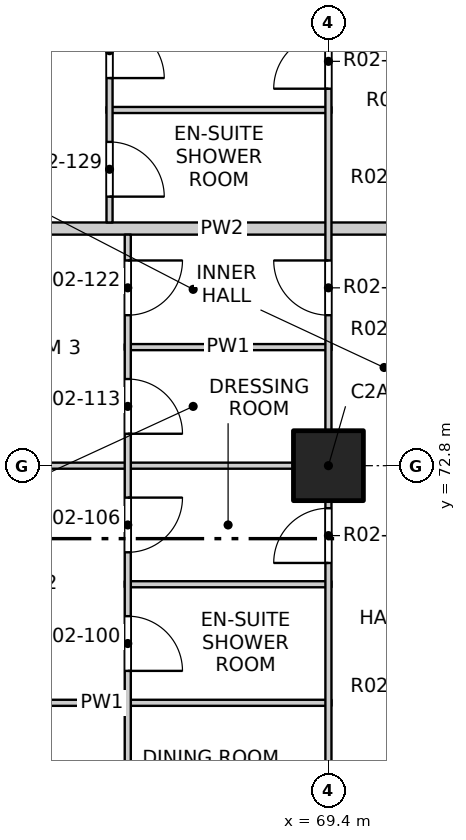
"""IFC4 building model, lengths in metres.
Left out: names, types, materials, properties, quantities, classifications, styles, units other than length and angle.
Written with IfcOpenShell. Run it as: python <this file> out.ifc"""

import sys

from ifc_helpers import new_model, si_unit, direction, frame, frame_2d, origin, origin_2d, place, context, subcontext, project, spatial, rectangle, extrude, element, fill, save


model = new_model("IFC4")
c1 = context("Model", 3, precision=1e-05, world=origin(), true_north=direction((0.0, 1.0)))
c2 = subcontext(c1, "Body", "Model", "MODEL_VIEW")
j1 = project(units=[si_unit("LENGTHUNIT", "METRE"), si_unit("PLANEANGLEUNIT", "RADIAN")], contexts=[c1])
p1 = place(None, origin())
s1 = spatial("IfcSite", under=j1, at=p1, CompositionType="ELEMENT")
p2 = place(p1, origin())
s2 = spatial("IfcBuilding", under=s1, at=p2, CompositionType="ELEMENT")
p3 = place(p2, frame((0.0, 0.0, 36.5)))
s3 = spatial("IfcBuildingStorey", under=s2, at=p3, CompositionType="ELEMENT", Elevation=36.5)
p4 = place(p3, frame((69.4, 72.8, -0.25), z_axis=(0.0, 0.0, 1.0), x_axis=(1.0, 0.0, 0.0)))
e1 = element("IfcColumn", 1, at=p4, inside=s3, PredefinedType="COLUMN", context=c2, shape_type="SweptSolid", body=[
    extrude(rectangle(XDim=1.15, YDim=1.15, at=origin_2d()), origin(), (0.0, 0.0, 1.0), 3.4),
])
p5 = place(p3, frame((61.9, 68.9, 0.0), z_axis=(0.0, 0.0, 1.0), x_axis=(1.0, 0.0, 0.0)))
e2 = element("IfcWall", 2, at=p5, inside=s3, PredefinedType="PARTITIONING", context=c2, shape_type="SweptSolid", body=[
    extrude(rectangle(XDim=7.55, YDim=0.1, at=frame_2d((3.775, 0.0))), origin(), (0.0, 0.0, 1.0), 3.15),
])
p6 = place(p3, frame((66.05, 70.85, 0.0), z_axis=(0.0, 0.0, 1.0), x_axis=(1.0, 0.0, 0.0)))
e3 = element("IfcWall", 3, at=p6, inside=s3, PredefinedType="PARTITIONING", context=c2, shape_type="SweptSolid", body=[
    extrude(rectangle(XDim=3.4, YDim=0.1, at=frame_2d((1.7, 0.0))), origin(), (0.0, 0.0, 1.0), 3.15),
])
p7 = place(p3, frame((61.9, 72.8, 0.0), z_axis=(0.0, 0.0, 1.0), x_axis=(1.0, 0.0, 0.0)))
e4 = element("IfcWall", 4, at=p7, inside=s3, PredefinedType="PARTITIONING", context=c2, shape_type="SweptSolid", body=[
    extrude(rectangle(XDim=7.55, YDim=0.1, at=frame_2d((3.775, 0.0))), origin(), (0.0, 0.0, 1.0), 2.55),
])
p8 = place(p3, frame((66.05, 74.75, 0.0), z_axis=(0.0, 0.0, 1.0), x_axis=(1.0, 0.0, 0.0)))
e5 = element("IfcWall", 5, at=p8, inside=s3, PredefinedType="PARTITIONING", context=c2, shape_type="SweptSolid", body=[
    extrude(rectangle(XDim=3.4, YDim=0.1, at=frame_2d((1.7, 0.0))), origin(), (0.0, 0.0, 1.0), 3.15),
])
p9 = place(p3, frame((61.9, 76.7, 0.0), z_axis=(0.0, 0.0, 1.0), x_axis=(1.0, 0.0, 0.0)))
e6 = element("IfcWall", 6, at=p9, inside=s3, PredefinedType="PARTITIONING", context=c2, shape_type="SweptSolid", body=[
    extrude(rectangle(XDim=11.5, YDim=0.2, at=frame_2d((5.75, 0.0))), origin(), (0.0, 0.0, 1.0), 3.15),
])
p10 = place(p3, frame((65.75, 78.65, 0.0), z_axis=(0.0, 0.0, 1.0), x_axis=(1.0, 0.0, 0.0)))
e7 = element("IfcWall", 7, at=p10, inside=s3, PredefinedType="PARTITIONING", context=c2, shape_type="SweptSolid", body=[
    extrude(rectangle(XDim=3.7, YDim=0.1, at=frame_2d((1.85, 0.0))), origin(), (0.0, 0.0, 1.0), 3.15),
])
p11 = place(p3, frame((65.8, 76.8, 0.0), z_axis=(0.0, 0.0, 1.0), x_axis=(0.0, 1.0, 0.0)))
e8 = element("IfcWall", 8, at=p11, inside=s3, PredefinedType="PARTITIONING", context=c2, shape_type="SweptSolid", body=[
    extrude(rectangle(XDim=11.3, YDim=0.1, at=frame_2d((5.65, 0.0))), origin(), (0.0, 0.0, 1.0), 3.15),
])
p12 = place(p11, frame((0.425, 0.0, 0.0)))
e9 = element("IfcOpeningElement", 9, at=p12, cuts=e8, PredefinedType="OPENING", context=c2, shape_type="SweptSolid", body=[
    extrude(rectangle(XDim=0.9, YDim=2.1, at=frame_2d((0.45, 1.05))), frame((0.0, 0.06, 0.0), z_axis=(0.0, -1.0, 0.0), x_axis=(1.0, 0.0, 0.0)), (0.0, 0.0, 1.0), 0.12),
])
p13 = place(p11, frame((2.375, 0.0, 0.0)))
e10 = element("IfcOpeningElement", 10, at=p13, cuts=e8, PredefinedType="OPENING", context=c2, shape_type="SweptSolid", body=[
    extrude(rectangle(XDim=0.9, YDim=2.1, at=frame_2d((0.45, 1.05))), frame((0.0, 0.06, 0.0), z_axis=(0.0, -1.0, 0.0), x_axis=(1.0, 0.0, 0.0)), (0.0, 0.0, 1.0), 0.12),
])
p14 = place(p11, frame((4.325, 0.0, 0.0)))
e11 = element("IfcOpeningElement", 11, at=p14, cuts=e8, PredefinedType="OPENING", context=c2, shape_type="SweptSolid", body=[
    extrude(rectangle(XDim=0.9, YDim=2.1, at=frame_2d((0.45, 1.05))), frame((0.0, 0.06, 0.0), z_axis=(0.0, -1.0, 0.0), x_axis=(1.0, 0.0, 0.0)), (0.0, 0.0, 1.0), 0.12),
])
p15 = place(p11, frame((6.275, 0.0, 0.0)))
e12 = element("IfcOpeningElement", 12, at=p15, cuts=e8, PredefinedType="OPENING", context=c2, shape_type="SweptSolid", body=[
    extrude(rectangle(XDim=0.9, YDim=2.1, at=frame_2d((0.45, 1.05))), frame((0.0, 0.06, 0.0), z_axis=(0.0, -1.0, 0.0), x_axis=(1.0, 0.0, 0.0)), (0.0, 0.0, 1.0), 0.12),
])
p16 = place(p11, frame((9.05, 0.0, 0.0)))
e13 = element("IfcOpeningElement", 13, at=p16, cuts=e8, PredefinedType="OPENING", context=c2, shape_type="SweptSolid", body=[
    extrude(rectangle(XDim=1.2, YDim=2.1, at=frame_2d((0.6, 1.05))), frame((0.0, 0.06, 0.0), z_axis=(0.0, -1.0, 0.0), x_axis=(1.0, 0.0, 0.0)), (0.0, 0.0, 1.0), 0.12),
])
p17 = place(p3, frame((66.1, 41.9, 0.0), z_axis=(0.0, 0.0, 1.0), x_axis=(0.0, 1.0, 0.0)))
e14 = element("IfcWall", 14, at=p17, inside=s3, PredefinedType="PARTITIONING", context=c2, shape_type="SweptSolid", body=[
    extrude(rectangle(XDim=34.7, YDim=0.1, at=frame_2d((17.35, 0.0))), origin(), (0.0, 0.0, 1.0), 3.15),
])
p18 = place(p17, frame((1.05, 0.0, 0.0)))
e15 = element("IfcOpeningElement", 15, at=p18, cuts=e14, PredefinedType="OPENING", context=c2, shape_type="SweptSolid", body=[
    extrude(rectangle(XDim=1.2, YDim=2.1, at=frame_2d((0.6, 1.05))), frame((0.0, 0.06, 0.0), z_axis=(0.0, -1.0, 0.0), x_axis=(1.0, 0.0, 0.0)), (0.0, 0.0, 1.0), 0.12),
])
p19 = place(p17, frame((4.95, 0.0, 0.0)))
e16 = element("IfcOpeningElement", 16, at=p19, cuts=e14, PredefinedType="OPENING", context=c2, shape_type="SweptSolid", body=[
    extrude(rectangle(XDim=1.2, YDim=2.1, at=frame_2d((0.6, 1.05))), frame((0.0, 0.06, 0.0), z_axis=(0.0, -1.0, 0.0), x_axis=(1.0, 0.0, 0.0)), (0.0, 0.0, 1.0), 0.12),
])
p20 = place(p17, frame((8.025, 0.0, 0.0)))
e17 = element("IfcOpeningElement", 17, at=p20, cuts=e14, PredefinedType="OPENING", context=c2, shape_type="SweptSolid", body=[
    extrude(rectangle(XDim=0.9, YDim=2.1, at=frame_2d((0.45, 1.05))), frame((0.0, 0.06, 0.0), z_axis=(0.0, -1.0, 0.0), x_axis=(1.0, 0.0, 0.0)), (0.0, 0.0, 1.0), 0.12),
])
p21 = place(p17, frame((9.975, 0.0, 0.0)))
e18 = element("IfcOpeningElement", 18, at=p21, cuts=e14, PredefinedType="OPENING", context=c2, shape_type="SweptSolid", body=[
    extrude(rectangle(XDim=0.9, YDim=2.1, at=frame_2d((0.45, 1.05))), frame((0.0, 0.06, 0.0), z_axis=(0.0, -1.0, 0.0), x_axis=(1.0, 0.0, 0.0)), (0.0, 0.0, 1.0), 0.12),
])
p22 = place(p17, frame((12.75, 0.0, 0.0)))
e19 = element("IfcOpeningElement", 19, at=p22, cuts=e14, PredefinedType="OPENING", context=c2, shape_type="SweptSolid", body=[
    extrude(rectangle(XDim=1.2, YDim=2.1, at=frame_2d((0.6, 1.05))), frame((0.0, 0.06, 0.0), z_axis=(0.0, -1.0, 0.0), x_axis=(1.0, 0.0, 0.0)), (0.0, 0.0, 1.0), 0.12),
])
p23 = place(p17, frame((15.825, 0.0, 0.0)))
e20 = element("IfcOpeningElement", 20, at=p23, cuts=e14, PredefinedType="OPENING", context=c2, shape_type="SweptSolid", body=[
    extrude(rectangle(XDim=0.9, YDim=2.1, at=frame_2d((0.45, 1.05))), frame((0.0, 0.06, 0.0), z_axis=(0.0, -1.0, 0.0), x_axis=(1.0, 0.0, 0.0)), (0.0, 0.0, 1.0), 0.12),
])
p24 = place(p17, frame((17.775, 0.0, 0.0)))
e21 = element("IfcOpeningElement", 21, at=p24, cuts=e14, PredefinedType="OPENING", context=c2, shape_type="SweptSolid", body=[
    extrude(rectangle(XDim=0.9, YDim=2.1, at=frame_2d((0.45, 1.05))), frame((0.0, 0.06, 0.0), z_axis=(0.0, -1.0, 0.0), x_axis=(1.0, 0.0, 0.0)), (0.0, 0.0, 1.0), 0.12),
])
p25 = place(p17, frame((19.725, 0.0, 0.0)))
e22 = element("IfcOpeningElement", 22, at=p25, cuts=e14, PredefinedType="OPENING", context=c2, shape_type="SweptSolid", body=[
    extrude(rectangle(XDim=0.9, YDim=2.1, at=frame_2d((0.45, 1.05))), frame((0.0, 0.06, 0.0), z_axis=(0.0, -1.0, 0.0), x_axis=(1.0, 0.0, 0.0)), (0.0, 0.0, 1.0), 0.12),
])
p26 = place(p17, frame((21.675, 0.0, 0.0)))
e23 = element("IfcOpeningElement", 23, at=p26, cuts=e14, PredefinedType="OPENING", context=c2, shape_type="SweptSolid", body=[
    extrude(rectangle(XDim=0.9, YDim=2.1, at=frame_2d((0.45, 1.05))), frame((0.0, 0.06, 0.0), z_axis=(0.0, -1.0, 0.0), x_axis=(1.0, 0.0, 0.0)), (0.0, 0.0, 1.0), 0.12),
])
p27 = place(p17, frame((24.45, 0.0, 0.0)))
e24 = element("IfcOpeningElement", 24, at=p27, cuts=e14, PredefinedType="OPENING", context=c2, shape_type="SweptSolid", body=[
    extrude(rectangle(XDim=1.2, YDim=2.1, at=frame_2d((0.6, 1.05))), frame((0.0, 0.06, 0.0), z_axis=(0.0, -1.0, 0.0), x_axis=(1.0, 0.0, 0.0)), (0.0, 0.0, 1.0), 0.12),
])
p28 = place(p17, frame((27.525, 0.0, 0.0)))
e25 = element("IfcOpeningElement", 25, at=p28, cuts=e14, PredefinedType="OPENING", context=c2, shape_type="SweptSolid", body=[
    extrude(rectangle(XDim=0.9, YDim=2.1, at=frame_2d((0.45, 1.05))), frame((0.0, 0.06, 0.0), z_axis=(0.0, -1.0, 0.0), x_axis=(1.0, 0.0, 0.0)), (0.0, 0.0, 1.0), 0.12),
])
p29 = place(p17, frame((29.475, 0.0, 0.0)))
e26 = element("IfcOpeningElement", 26, at=p29, cuts=e14, PredefinedType="OPENING", context=c2, shape_type="SweptSolid", body=[
    extrude(rectangle(XDim=0.9, YDim=2.1, at=frame_2d((0.45, 1.05))), frame((0.0, 0.06, 0.0), z_axis=(0.0, -1.0, 0.0), x_axis=(1.0, 0.0, 0.0)), (0.0, 0.0, 1.0), 0.12),
])
p30 = place(p17, frame((31.425, 0.0, 0.0)))
e27 = element("IfcOpeningElement", 27, at=p30, cuts=e14, PredefinedType="OPENING", context=c2, shape_type="SweptSolid", body=[
    extrude(rectangle(XDim=0.9, YDim=2.1, at=frame_2d((0.45, 1.05))), frame((0.0, 0.06, 0.0), z_axis=(0.0, -1.0, 0.0), x_axis=(1.0, 0.0, 0.0)), (0.0, 0.0, 1.0), 0.12),
])
p31 = place(p17, frame((33.375, 0.0, 0.0)))
e28 = element("IfcOpeningElement", 28, at=p31, cuts=e14, PredefinedType="OPENING", context=c2, shape_type="SweptSolid", body=[
    extrude(rectangle(XDim=0.9, YDim=2.1, at=frame_2d((0.45, 1.05))), frame((0.0, 0.06, 0.0), z_axis=(0.0, -1.0, 0.0), x_axis=(1.0, 0.0, 0.0)), (0.0, 0.0, 1.0), 0.12),
])
p32 = place(p3, frame((69.4, 41.9, 0.0), z_axis=(0.0, 0.0, 1.0), x_axis=(0.0, 1.0, 0.0)))
e29 = element("IfcWall", 29, at=p32, inside=s3, PredefinedType="PARTITIONING", context=c2, shape_type="SweptSolid", body=[
    extrude(rectangle(XDim=46.2, YDim=0.1, at=frame_2d((23.1, 0.0))), origin(), (0.0, 0.0, 1.0), 3.15),
])
p33 = place(p32, frame((1.2, 0.0, 0.0)))
e30 = element("IfcOpeningElement", 30, at=p33, cuts=e29, PredefinedType="OPENING", context=c2, shape_type="SweptSolid", body=[
    extrude(rectangle(XDim=0.9, YDim=2.1, at=frame_2d((0.45, 1.05))), frame((0.0, 0.06, 0.0), z_axis=(0.0, -1.0, 0.0), x_axis=(1.0, 0.0, 0.0)), (0.0, 0.0, 1.0), 0.12),
])
p34 = place(p32, frame((5.1, 0.0, 0.0)))
e31 = element("IfcOpeningElement", 31, at=p34, cuts=e29, PredefinedType="OPENING", context=c2, shape_type="SweptSolid", body=[
    extrude(rectangle(XDim=0.9, YDim=2.1, at=frame_2d((0.45, 1.05))), frame((0.0, 0.06, 0.0), z_axis=(0.0, -1.0, 0.0), x_axis=(1.0, 0.0, 0.0)), (0.0, 0.0, 1.0), 0.12),
])
p35 = place(p32, frame((9.975, 0.0, 0.0)))
e32 = element("IfcOpeningElement", 32, at=p35, cuts=e29, PredefinedType="OPENING", context=c2, shape_type="SweptSolid", body=[
    extrude(rectangle(XDim=0.9, YDim=2.1, at=frame_2d((0.45, 1.05))), frame((0.0, 0.06, 0.0), z_axis=(0.0, -1.0, 0.0), x_axis=(1.0, 0.0, 0.0)), (0.0, 0.0, 1.0), 0.12),
])
p36 = place(p32, frame((12.9, 0.0, 0.0)))
e33 = element("IfcOpeningElement", 33, at=p36, cuts=e29, PredefinedType="OPENING", context=c2, shape_type="SweptSolid", body=[
    extrude(rectangle(XDim=0.9, YDim=2.1, at=frame_2d((0.45, 1.05))), frame((0.0, 0.06, 0.0), z_axis=(0.0, -1.0, 0.0), x_axis=(1.0, 0.0, 0.0)), (0.0, 0.0, 1.0), 0.12),
])
p37 = place(p32, frame((17.775, 0.0, 0.0)))
e34 = element("IfcOpeningElement", 34, at=p37, cuts=e29, PredefinedType="OPENING", context=c2, shape_type="SweptSolid", body=[
    extrude(rectangle(XDim=0.9, YDim=2.1, at=frame_2d((0.45, 1.05))), frame((0.0, 0.06, 0.0), z_axis=(0.0, -1.0, 0.0), x_axis=(1.0, 0.0, 0.0)), (0.0, 0.0, 1.0), 0.12),
])
p38 = place(p32, frame((21.5, 0.0, 0.0)))
e35 = element("IfcOpeningElement", 35, at=p38, cuts=e29, PredefinedType="OPENING", context=c2, shape_type="SweptSolid", body=[
    extrude(rectangle(XDim=0.9, YDim=2.1, at=frame_2d((0.45, 1.05))), frame((0.0, 0.06, 0.0), z_axis=(0.0, -1.0, 0.0), x_axis=(1.0, 0.0, 0.0)), (0.0, 0.0, 1.0), 0.12),
])
p39 = place(p32, frame((24.6, 0.0, 0.0)))
e36 = element("IfcOpeningElement", 36, at=p39, cuts=e29, PredefinedType="OPENING", context=c2, shape_type="SweptSolid", body=[
    extrude(rectangle(XDim=0.9, YDim=2.1, at=frame_2d((0.45, 1.05))), frame((0.0, 0.06, 0.0), z_axis=(0.0, -1.0, 0.0), x_axis=(1.0, 0.0, 0.0)), (0.0, 0.0, 1.0), 0.12),
])
p40 = place(p32, frame((29.3, 0.0, 0.0)))
e37 = element("IfcOpeningElement", 37, at=p40, cuts=e29, PredefinedType="OPENING", context=c2, shape_type="SweptSolid", body=[
    extrude(rectangle(XDim=0.9, YDim=2.1, at=frame_2d((0.45, 1.05))), frame((0.0, 0.06, 0.0), z_axis=(0.0, -1.0, 0.0), x_axis=(1.0, 0.0, 0.0)), (0.0, 0.0, 1.0), 0.12),
])
p41 = place(p32, frame((33.375, 0.0, 0.0)))
e38 = element("IfcOpeningElement", 38, at=p41, cuts=e29, PredefinedType="OPENING", context=c2, shape_type="SweptSolid", body=[
    extrude(rectangle(XDim=0.9, YDim=2.1, at=frame_2d((0.45, 1.05))), frame((0.0, 0.06, 0.0), z_axis=(0.0, -1.0, 0.0), x_axis=(1.0, 0.0, 0.0)), (0.0, 0.0, 1.0), 0.12),
])
p42 = place(p32, frame((37.1, 0.0, 0.0)))
e39 = element("IfcOpeningElement", 39, at=p42, cuts=e29, PredefinedType="OPENING", context=c2, shape_type="SweptSolid", body=[
    extrude(rectangle(XDim=0.9, YDim=2.1, at=frame_2d((0.45, 1.05))), frame((0.0, 0.06, 0.0), z_axis=(0.0, -1.0, 0.0), x_axis=(1.0, 0.0, 0.0)), (0.0, 0.0, 1.0), 0.12),
])
p43 = place(p32, frame((41.175, 0.0, 0.0)))
e40 = element("IfcOpeningElement", 40, at=p43, cuts=e29, PredefinedType="OPENING", context=c2, shape_type="SweptSolid", body=[
    extrude(rectangle(XDim=0.9, YDim=2.1, at=frame_2d((0.45, 1.05))), frame((0.0, 0.06, 0.0), z_axis=(0.0, -1.0, 0.0), x_axis=(1.0, 0.0, 0.0)), (0.0, 0.0, 1.0), 0.12),
])
p44 = place(p32, frame((44.1, 0.0, 0.0)))
e41 = element("IfcOpeningElement", 41, at=p44, cuts=e29, PredefinedType="OPENING", context=c2, shape_type="SweptSolid", body=[
    extrude(rectangle(XDim=0.9, YDim=2.1, at=frame_2d((0.45, 1.05))), frame((0.0, 0.06, 0.0), z_axis=(0.0, -1.0, 0.0), x_axis=(1.0, 0.0, 0.0)), (0.0, 0.0, 1.0), 0.12),
])
p45 = place(p28, origin())
e42 = element("IfcDoor", 42, at=p45, inside=s3, OperationType="SINGLE_SWING_RIGHT", PredefinedType="DOOR", context=c2, shape_type="SweptSolid", body=[
    extrude(rectangle(XDim=0.9, YDim=2.1, at=frame_2d((0.45, 1.05))), frame((0.0, 0.025, 0.0), z_axis=(0.0, -1.0, 0.0), x_axis=(1.0, 0.0, 0.0)), (0.0, 0.0, 1.0), 0.05),
])
fill(e25, e42)
p46 = place(p40, origin())
e43 = element("IfcDoor", 43, at=p46, inside=s3, OperationType="SINGLE_SWING_LEFT", PredefinedType="DOOR", context=c2, shape_type="SweptSolid", body=[
    extrude(rectangle(XDim=0.9, YDim=2.1, at=frame_2d((0.45, 1.05))), frame((0.0, 0.025, 0.0), z_axis=(0.0, -1.0, 0.0), x_axis=(1.0, 0.0, 0.0)), (0.0, 0.0, 1.0), 0.05),
])
fill(e37, e43)
p47 = place(p29, origin())
e44 = element("IfcDoor", 44, at=p47, inside=s3, OperationType="SINGLE_SWING_LEFT", PredefinedType="DOOR", context=c2, shape_type="SweptSolid", body=[
    extrude(rectangle(XDim=0.9, YDim=2.1, at=frame_2d((0.45, 1.05))), frame((0.0, 0.025, 0.0), z_axis=(0.0, -1.0, 0.0), x_axis=(1.0, 0.0, 0.0)), (0.0, 0.0, 1.0), 0.05),
])
fill(e26, e44)
p48 = place(p30, origin())
e45 = element("IfcDoor", 45, at=p48, inside=s3, OperationType="SINGLE_SWING_RIGHT", PredefinedType="DOOR", context=c2, shape_type="SweptSolid", body=[
    extrude(rectangle(XDim=0.9, YDim=2.1, at=frame_2d((0.45, 1.05))), frame((0.0, 0.025, 0.0), z_axis=(0.0, -1.0, 0.0), x_axis=(1.0, 0.0, 0.0)), (0.0, 0.0, 1.0), 0.05),
])
fill(e27, e45)
p49 = place(p31, origin())
e46 = element("IfcDoor", 46, at=p49, inside=s3, OperationType="SINGLE_SWING_LEFT", PredefinedType="DOOR", context=c2, shape_type="SweptSolid", body=[
    extrude(rectangle(XDim=0.9, YDim=2.1, at=frame_2d((0.45, 1.05))), frame((0.0, 0.025, 0.0), z_axis=(0.0, -1.0, 0.0), x_axis=(1.0, 0.0, 0.0)), (0.0, 0.0, 1.0), 0.05),
])
fill(e28, e46)
p50 = place(p41, origin())
e47 = element("IfcDoor", 47, at=p50, inside=s3, OperationType="SINGLE_SWING_RIGHT", PredefinedType="DOOR", context=c2, shape_type="SweptSolid", body=[
    extrude(rectangle(XDim=0.9, YDim=2.1, at=frame_2d((0.45, 1.05))), frame((0.0, 0.025, 0.0), z_axis=(0.0, -1.0, 0.0), x_axis=(1.0, 0.0, 0.0)), (0.0, 0.0, 1.0), 0.05),
])
fill(e38, e47)
p51 = place(p12, origin())
e48 = element("IfcDoor", 48, at=p51, inside=s3, OperationType="SINGLE_SWING_RIGHT", PredefinedType="DOOR", context=c2, shape_type="SweptSolid", body=[
    extrude(rectangle(XDim=0.9, YDim=2.1, at=frame_2d((0.45, 1.05))), frame((0.0, 0.025, 0.0), z_axis=(0.0, -1.0, 0.0), x_axis=(1.0, 0.0, 0.0)), (0.0, 0.0, 1.0), 0.05),
])
fill(e9, e48)
p52 = place(p42, origin())
e49 = element("IfcDoor", 49, at=p52, inside=s3, OperationType="SINGLE_SWING_LEFT", PredefinedType="DOOR", context=c2, shape_type="SweptSolid", body=[
    extrude(rectangle(XDim=0.9, YDim=2.1, at=frame_2d((0.45, 1.05))), frame((0.0, 0.025, 0.0), z_axis=(0.0, -1.0, 0.0), x_axis=(1.0, 0.0, 0.0)), (0.0, 0.0, 1.0), 0.05),
])
fill(e39, e49)
p53 = place(p13, origin())
e50 = element("IfcDoor", 50, at=p53, inside=s3, OperationType="SINGLE_SWING_RIGHT", PredefinedType="DOOR", context=c2, shape_type="SweptSolid", body=[
    extrude(rectangle(XDim=0.9, YDim=2.1, at=frame_2d((0.45, 1.05))), frame((0.0, 0.025, 0.0), z_axis=(0.0, -1.0, 0.0), x_axis=(1.0, 0.0, 0.0)), (0.0, 0.0, 1.0), 0.05),
])
fill(e10, e50)
save(model, sys.argv[1])
